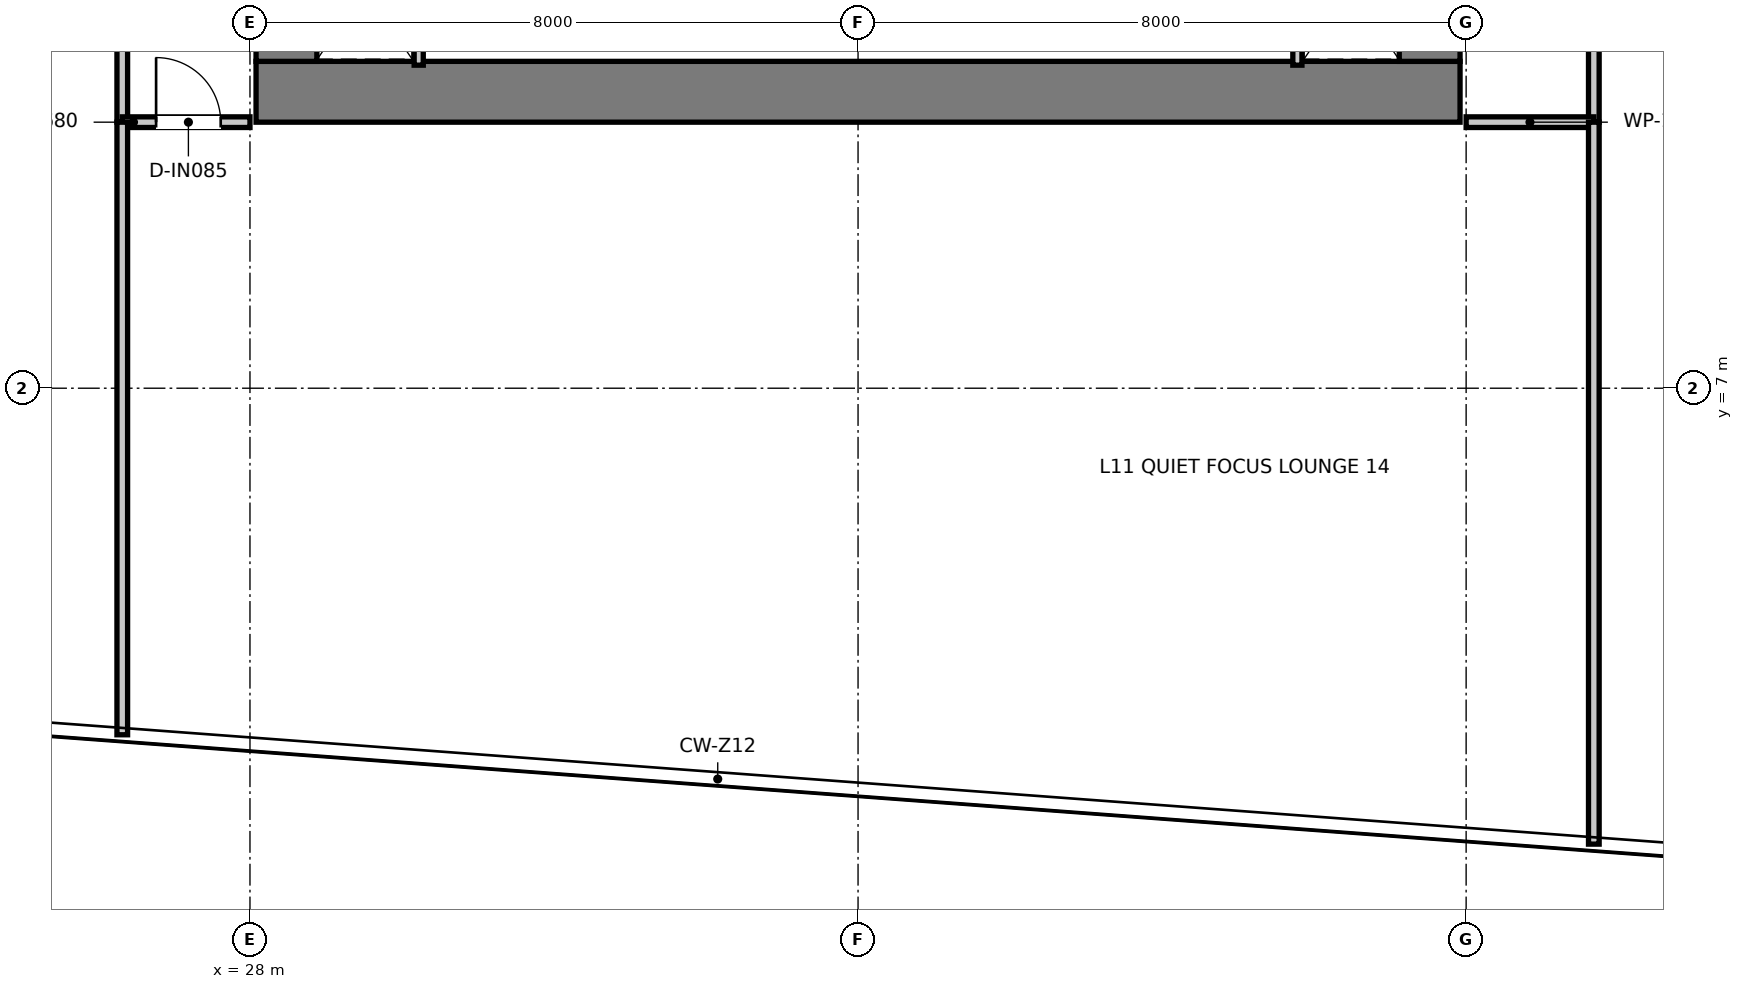
"""IFC4 building model, lengths in metres.
Left out: names, types, materials, properties, quantities, classifications, styles, units other than length and angle.
Written with IfcOpenShell. Run it as: python <this file> out.ifc"""

import sys

from ifc_helpers import new_model, si_unit, direction, frame, frame_2d, origin, place, context, subcontext, project, spatial, rectangle, extrude, element, fill, save


model = new_model("IFC4")
c1 = context("Model", 3, precision=1e-05, world=origin(), true_north=direction((0.0, 1.0)))
c2 = subcontext(c1, "Body", "Model", "MODEL_VIEW")
j1 = project(units=[si_unit("LENGTHUNIT", "METRE"), si_unit("PLANEANGLEUNIT", "RADIAN")], contexts=[c1])
p1 = place(None, origin())
s1 = spatial("IfcSite", under=j1, at=p1, CompositionType="ELEMENT")
p2 = place(p1, origin())
s2 = spatial("IfcBuilding", under=s1, at=p2, CompositionType="ELEMENT")
p3 = place(p2, frame((0.0, 0.0, 48.7)))
s3 = spatial("IfcBuildingStorey", under=s2, at=p3, CompositionType="ELEMENT", Elevation=48.7)
p4 = place(p3, frame((28.08, 10.9, 0.0), z_axis=(0.0, 0.0, 1.0), x_axis=(1.0, 0.0, 0.0)))
e1 = element("IfcWall", 1, at=p4, inside=s3, PredefinedType="SHEAR", context=c2, shape_type="SweptSolid", body=[
    extrude(rectangle(XDim=15.84, YDim=0.8, at=frame_2d((7.92, 0.0))), origin(), (0.0, 0.0, 1.0), 3.95),
])
for number, where, z_axis, x_axis in (
    (2, (28.48, 11.3, 0.0), (0.0, 0.0, 1.0), (0.0, 1.0, 0.0)),
    (3, (43.52, 11.3, 0.0), (0.0, 0.0, 1.0), (0.0, 1.0, 0.0)),
):
    element("IfcWall", number, at=place(p3, frame(where, z_axis=z_axis, x_axis=x_axis)), inside=s3, PredefinedType="SHEAR", context=c2, shape_type="SweptSolid", body=[
        extrude(rectangle(XDim=14.7, YDim=0.8, at=frame_2d((7.35, 0.0))), origin(), (0.0, 0.0, 1.0), 3.95),
    ])
for number, where, z_axis, x_axis in (
    (4, (30.22, 11.25, 0.0), (0.0, 0.0, 1.0), (0.0, 1.0, 0.0)),
    (5, (41.78, 11.25, 0.0), (0.0, 0.0, 1.0), (0.0, 1.0, 0.0)),
):
    element("IfcWall", number, at=place(p3, frame(where, z_axis=z_axis, x_axis=x_axis)), inside=s3, PredefinedType="PARTITIONING", context=c2, shape_type="SweptSolid", body=[
        extrude(rectangle(XDim=1.97, YDim=0.12, at=frame_2d((0.985, 0.0))), origin(), (0.0, 0.0, 1.0), 3.67),
    ])
p5 = place(p3, frame((26.32, 10.5, 0.0), z_axis=(0.0, 0.0, 1.0), x_axis=(0.0, 1.0, 0.0)))
e6 = element("IfcWall", 6, at=p5, inside=s3, PredefinedType="PARTITIONING", context=c2, shape_type="SweptSolid", body=[
    extrude(rectangle(XDim=25.62, YDim=0.14, at=frame_2d((12.81, 0.0))), origin(), (0.0, 0.0, 1.0), 2.97),
])
p6 = place(p5, frame((7.675, 0.0, 0.0)))
e7 = element("IfcOpeningElement", 7, at=p6, cuts=e6, PredefinedType="OPENING", context=c2, shape_type="SweptSolid", body=[
    extrude(rectangle(XDim=0.95, YDim=2.1, at=frame_2d((0.475, 1.05))), frame((0.0, 0.08, 0.0), z_axis=(0.0, -1.0, 0.0), x_axis=(1.0, 0.0, 0.0)), (0.0, 0.0, 1.0), 0.16),
])
p7 = place(p5, frame((10.525, 0.0, 0.0)))
e8 = element("IfcOpeningElement", 8, at=p7, cuts=e6, PredefinedType="OPENING", context=c2, shape_type="SweptSolid", body=[
    extrude(rectangle(XDim=0.95, YDim=2.1, at=frame_2d((0.475, 1.05))), frame((0.0, 0.08, 0.0), z_axis=(0.0, -1.0, 0.0), x_axis=(1.0, 0.0, 0.0)), (0.0, 0.0, 1.0), 0.16),
])
p8 = place(p5, frame((13.925, 0.0, 0.0)))
e9 = element("IfcOpeningElement", 9, at=p8, cuts=e6, PredefinedType="OPENING", context=c2, shape_type="SweptSolid", body=[
    extrude(rectangle(XDim=0.95, YDim=2.1, at=frame_2d((0.475, 1.05))), frame((0.0, 0.08, 0.0), z_axis=(0.0, -1.0, 0.0), x_axis=(1.0, 0.0, 0.0)), (0.0, 0.0, 1.0), 0.16),
])
p9 = place(p5, frame((17.325, 0.0, 0.0)))
e10 = element("IfcOpeningElement", 10, at=p9, cuts=e6, PredefinedType="OPENING", context=c2, shape_type="SweptSolid", body=[
    extrude(rectangle(XDim=0.95, YDim=2.1, at=frame_2d((0.475, 1.05))), frame((0.0, 0.08, 0.0), z_axis=(0.0, -1.0, 0.0), x_axis=(1.0, 0.0, 0.0)), (0.0, 0.0, 1.0), 0.16),
])
p10 = place(p5, frame((20.725, 0.0, 0.0)))
e11 = element("IfcOpeningElement", 11, at=p10, cuts=e6, PredefinedType="OPENING", context=c2, shape_type="SweptSolid", body=[
    extrude(rectangle(XDim=0.95, YDim=2.1, at=frame_2d((0.475, 1.05))), frame((0.0, 0.08, 0.0), z_axis=(0.0, -1.0, 0.0), x_axis=(1.0, 0.0, 0.0)), (0.0, 0.0, 1.0), 0.16),
])
p11 = place(p5, frame((23.075, 0.0, 0.0)))
e12 = element("IfcOpeningElement", 12, at=p11, cuts=e6, PredefinedType="OPENING", context=c2, shape_type="SweptSolid", body=[
    extrude(rectangle(XDim=0.95, YDim=2.1, at=frame_2d((0.475, 1.05))), frame((0.0, 0.08, 0.0), z_axis=(0.0, -1.0, 0.0), x_axis=(1.0, 0.0, 0.0)), (0.0, 0.0, 1.0), 0.16),
])
p12 = place(p3, frame((45.68, 10.5, 0.0), z_axis=(0.0, 0.0, 1.0), x_axis=(0.0, 1.0, 0.0)))
e13 = element("IfcWall", 13, at=p12, inside=s3, PredefinedType="PARTITIONING", context=c2, shape_type="SweptSolid", body=[
    extrude(rectangle(XDim=25.62, YDim=0.14, at=frame_2d((12.81, 0.0))), origin(), (0.0, 0.0, 1.0), 2.97),
])
p13 = place(p12, frame((7.675, 0.0, 0.0)))
e14 = element("IfcOpeningElement", 14, at=p13, cuts=e13, PredefinedType="OPENING", context=c2, shape_type="SweptSolid", body=[
    extrude(rectangle(XDim=0.95, YDim=2.1, at=frame_2d((0.475, 1.05))), frame((0.0, 0.08, 0.0), z_axis=(0.0, -1.0, 0.0), x_axis=(1.0, 0.0, 0.0)), (0.0, 0.0, 1.0), 0.16),
])
p14 = place(p12, frame((10.525, 0.0, 0.0)))
e15 = element("IfcOpeningElement", 15, at=p14, cuts=e13, PredefinedType="OPENING", context=c2, shape_type="SweptSolid", body=[
    extrude(rectangle(XDim=0.95, YDim=2.1, at=frame_2d((0.475, 1.05))), frame((0.0, 0.08, 0.0), z_axis=(0.0, -1.0, 0.0), x_axis=(1.0, 0.0, 0.0)), (0.0, 0.0, 1.0), 0.16),
])
p15 = place(p12, frame((13.925, 0.0, 0.0)))
e16 = element("IfcOpeningElement", 16, at=p15, cuts=e13, PredefinedType="OPENING", context=c2, shape_type="SweptSolid", body=[
    extrude(rectangle(XDim=0.95, YDim=2.1, at=frame_2d((0.475, 1.05))), frame((0.0, 0.08, 0.0), z_axis=(0.0, -1.0, 0.0), x_axis=(1.0, 0.0, 0.0)), (0.0, 0.0, 1.0), 0.16),
])
p16 = place(p12, frame((17.325, 0.0, 0.0)))
e17 = element("IfcOpeningElement", 17, at=p16, cuts=e13, PredefinedType="OPENING", context=c2, shape_type="SweptSolid", body=[
    extrude(rectangle(XDim=0.95, YDim=2.1, at=frame_2d((0.475, 1.05))), frame((0.0, 0.08, 0.0), z_axis=(0.0, -1.0, 0.0), x_axis=(1.0, 0.0, 0.0)), (0.0, 0.0, 1.0), 0.16),
])
p17 = place(p12, frame((20.725, 0.0, 0.0)))
e18 = element("IfcOpeningElement", 18, at=p17, cuts=e13, PredefinedType="OPENING", context=c2, shape_type="SweptSolid", body=[
    extrude(rectangle(XDim=0.95, YDim=2.1, at=frame_2d((0.475, 1.05))), frame((0.0, 0.08, 0.0), z_axis=(0.0, -1.0, 0.0), x_axis=(1.0, 0.0, 0.0)), (0.0, 0.0, 1.0), 0.16),
])
p18 = place(p12, frame((23.075, 0.0, 0.0)))
e19 = element("IfcOpeningElement", 19, at=p18, cuts=e13, PredefinedType="OPENING", context=c2, shape_type="SweptSolid", body=[
    extrude(rectangle(XDim=0.95, YDim=2.1, at=frame_2d((0.475, 1.05))), frame((0.0, 0.08, 0.0), z_axis=(0.0, -1.0, 0.0), x_axis=(1.0, 0.0, 0.0)), (0.0, 0.0, 1.0), 0.16),
])
p19 = place(p3, frame((26.32, 10.5, 0.0), z_axis=(0.0, 0.0, 1.0), x_axis=(1.0, 0.0, 0.0)))
e20 = element("IfcWall", 20, at=p19, inside=s3, PredefinedType="PARTITIONING", context=c2, shape_type="SweptSolid", body=[
    extrude(rectangle(XDim=1.68, YDim=0.14, at=frame_2d((0.84, 0.0))), origin(), (0.0, 0.0, 1.0), 3.67),
])
p20 = place(p19, frame((0.445, 0.0, 0.0)))
e21 = element("IfcOpeningElement", 21, at=p20, cuts=e20, PredefinedType="OPENING", context=c2, shape_type="SweptSolid", body=[
    extrude(rectangle(XDim=0.85, YDim=2.1, at=frame_2d((0.425, 1.05))), frame((0.0, 0.08, 0.0), z_axis=(0.0, -1.0, 0.0), x_axis=(1.0, 0.0, 0.0)), (0.0, 0.0, 1.0), 0.16),
])
p21 = place(p3, frame((44.0, 10.5, 0.0), z_axis=(0.0, 0.0, 1.0), x_axis=(1.0, 0.0, 0.0)))
e22 = element("IfcWall", 22, at=p21, inside=s3, PredefinedType="PARTITIONING", context=c2, shape_type="SweptSolid", body=[
    extrude(rectangle(XDim=1.68, YDim=0.14, at=frame_2d((0.84, 0.0))), origin(), (0.0, 0.0, 1.0), 3.67),
])
p22 = place(p3, frame((26.32, 2.441, 0.0), z_axis=(0.0, 0.0, 1.0), x_axis=(0.0, 1.0, 0.0)))
e23 = element("IfcWall", 23, at=p22, inside=s3, PredefinedType="PARTITIONING", context=c2, shape_type="SweptSolid", body=[
    extrude(rectangle(XDim=8.059, YDim=0.14, at=frame_2d((4.03, 0.0))), origin(), (0.0, 0.0, 1.0), 3.67),
])
p23 = place(p3, frame((45.68, 1.002, 0.0), z_axis=(0.0, 0.0, 1.0), x_axis=(0.0, 1.0, 0.0)))
e24 = element("IfcWall", 24, at=p23, inside=s3, PredefinedType="PARTITIONING", context=c2, shape_type="SweptSolid", body=[
    extrude(rectangle(XDim=9.498, YDim=0.14, at=frame_2d((4.749, 0.0))), origin(), (0.0, 0.0, 1.0), 3.67),
])
p24 = place(p20, origin())
e25 = element("IfcDoor", 25, at=p24, inside=s3, OperationType="SINGLE_SWING_LEFT", PredefinedType="DOOR", context=c2, shape_type="SweptSolid", body=[
    extrude(rectangle(XDim=0.85, YDim=2.1, at=frame_2d((0.425, 1.05))), frame((0.0, 0.025, 0.0), z_axis=(0.0, -1.0, 0.0), x_axis=(1.0, 0.0, 0.0)), (0.0, 0.0, 1.0), 0.05),
])
fill(e21, e25)
save(model, sys.argv[1])
